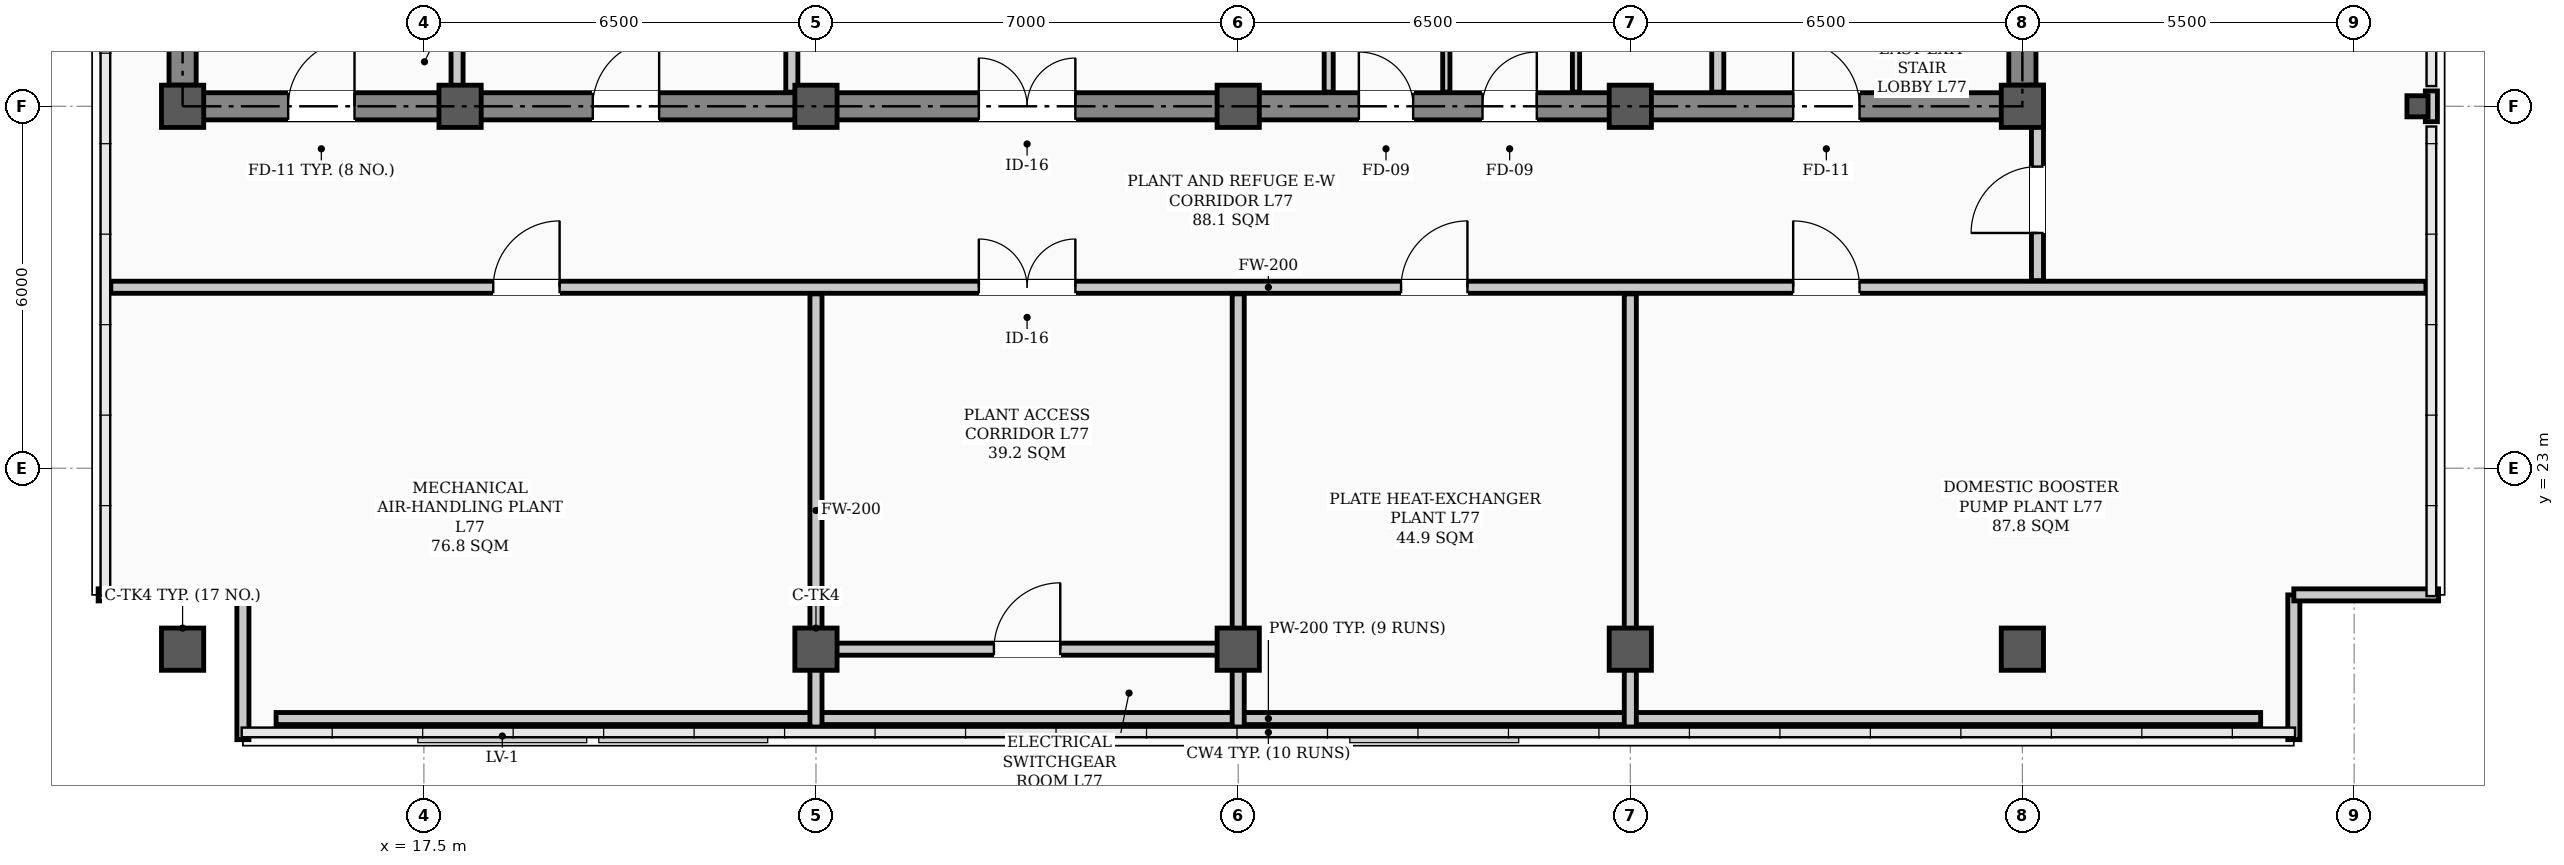
"""IFC4 building model, lengths in metres.
Left out: names, types, materials, properties, quantities, classifications, styles, units other than length and angle.
Written with IfcOpenShell. Run it as: python <this file> out.ifc"""

import sys

from ifc_helpers import new_model, si_unit, direction, frame, frame_2d, origin, origin_2d, place, context, subcontext, project, spatial, rectangle, hollow_rectangle, extrude, element, fill, save


model = new_model("IFC4")
c1 = context("Model", 3, precision=1e-05, world=origin(), true_north=direction((0.0, 1.0)))
c2 = subcontext(c1, "Body", "Model", "MODEL_VIEW")
j1 = project(units=[si_unit("LENGTHUNIT", "METRE"), si_unit("PLANEANGLEUNIT", "RADIAN")], contexts=[c1])
p1 = place(None, origin())
s1 = spatial("IfcSite", under=j1, at=p1, CompositionType="ELEMENT")
p2 = place(p1, origin())
s2 = spatial("IfcBuilding", under=s1, at=p2, CompositionType="ELEMENT")
p3 = place(p2, frame((0.0, 0.0, 312.6)))
s3 = spatial("IfcBuildingStorey", under=s2, at=p3, CompositionType="ELEMENT", Elevation=312.6)
for number, where, z_axis, x_axis in (
    (1, (13.5, 29.0, 0.0), (0.0, 0.0, 1.0), (1.0, 0.0, 0.0)),
    (2, (18.1, 29.0, 0.0), (0.0, 0.0, 1.0), (1.0, 0.0, 0.0)),
    (3, (24.0, 29.0, 0.0), (0.0, 0.0, 1.0), (1.0, 0.0, 0.0)),
    (4, (31.0, 29.0, 0.0), (0.0, 0.0, 1.0), (1.0, 0.0, 0.0)),
    (5, (37.5, 29.0, 0.0), (0.0, 0.0, 1.0), (1.0, 0.0, 0.0)),
    (6, (44.0, 29.0, 0.0), (0.0, 0.0, 1.0), (1.0, 0.0, 0.0)),
    (7, (13.5, 20.0, 0.0), (0.0, 0.0, 1.0), (1.0, 0.0, 0.0)),
    (8, (24.0, 20.0, 0.0), (0.0, 0.0, 1.0), (1.0, 0.0, 0.0)),
    (9, (31.0, 20.0, 0.0), (0.0, 0.0, 1.0), (1.0, 0.0, 0.0)),
    (10, (37.5, 20.0, 0.0), (0.0, 0.0, 1.0), (1.0, 0.0, 0.0)),
    (11, (44.0, 20.0, 0.0), (0.0, 0.0, 1.0), (1.0, 0.0, 0.0)),
):
    element("IfcColumn", number, at=place(p3, frame(where, z_axis=z_axis, x_axis=x_axis)), inside=s3, PredefinedType="COLUMN", context=c2, shape_type="SweptSolid", body=[
        extrude(hollow_rectangle(XDim=0.7, YDim=0.7, WallThickness=0.028, InnerFilletRadius=0.014, OuterFilletRadius=0.042, at=origin_2d()), origin(), (0.0, 0.0, 1.0), 4.8),
    ])
p4 = place(p3, frame((50.55, 29.0, 0.0), z_axis=(0.0, 0.0, 1.0), x_axis=(1.0, 0.0, 0.0)))
e12 = element("IfcColumn", 12, at=p4, inside=s3, PredefinedType="COLUMN", context=c2, shape_type="SweptSolid", body=[
    extrude(hollow_rectangle(XDim=0.35, YDim=0.35, WallThickness=0.016, InnerFilletRadius=0.016, OuterFilletRadius=0.032, at=origin_2d()), origin(), (0.0, 0.0, 1.0), 4.8),
])
p5 = place(p3, frame((50.78, 28.745, 0.0), z_axis=(0.0, 0.0, 1.0), x_axis=(0.0, 1.0, 0.0)))
e13 = element("IfcWall", 13, at=p5, inside=s3, PredefinedType="PARAPET", context=c2, shape_type="SweptSolid", body=[
    extrude(rectangle(XDim=0.51, YDim=0.2, at=frame_2d((0.255, 0.0))), origin(), (0.0, 0.0, 1.0), 1.2),
])
for number, where, z_axis, x_axis in (
    (14, (12.1, 20.9, 0.0), (0.0, 0.0, 1.0), (1.0, 0.0, 0.0)),
    (15, (14.5, 20.9, 0.0), (0.0, 0.0, 1.0), (0.0, -1.0, 0.0)),
    (16, (48.5, 18.5, 0.0), (0.0, 0.0, 1.0), (0.0, 1.0, 0.0)),
    (17, (48.5, 20.9, 0.0), (0.0, 0.0, 1.0), (1.0, 0.0, 0.0)),
):
    element("IfcWall", number, at=place(p3, frame(where, z_axis=z_axis, x_axis=x_axis)), inside=s3, PredefinedType="PARAPET", context=c2, shape_type="SweptSolid", body=[
        extrude(rectangle(XDim=2.4, YDim=0.2, at=frame_2d((1.2, 0.0))), origin(), (0.0, 0.0, 1.0), 1.2),
    ])
p6 = place(p3, frame((15.05, 18.85, 0.0), z_axis=(0.0, 0.0, 1.0), x_axis=(1.0, 0.0, 0.0)))
e18 = element("IfcWall", 18, at=p6, inside=s3, PredefinedType="PARAPET", context=c2, shape_type="SweptSolid", body=[
    extrude(rectangle(XDim=32.9, YDim=0.2, at=frame_2d((16.45, 0.0))), origin(), (0.0, 0.0, 1.0), 1.15),
])
p7 = place(p3, frame((13.5, 29.0, 0.0), z_axis=(0.0, 0.0, 1.0), x_axis=(1.0, 0.0, 0.0)))
e19 = element("IfcWall", 19, at=p7, inside=s3, PredefinedType="SHEAR", context=c2, shape_type="SweptSolid", body=[
    extrude(rectangle(XDim=30.5, YDim=0.45, at=frame_2d((15.25, 0.0))), origin(), (0.0, 0.0, 1.0), 4.45),
])
p8 = place(p7, frame((1.75, 0.0, 0.0)))
e20 = element("IfcOpeningElement", 20, at=p8, cuts=e19, PredefinedType="OPENING", context=c2, shape_type="SweptSolid", body=[
    extrude(rectangle(XDim=1.1, YDim=2.08, at=frame_2d((0.55, 1.04))), frame((0.0, 0.235, 0.0), z_axis=(0.0, -1.0, 0.0), x_axis=(1.0, 0.0, 0.0)), (0.0, 0.0, 1.0), 0.47),
])
p9 = place(p7, frame((26.7, 0.0, 0.0)))
e21 = element("IfcOpeningElement", 21, at=p9, cuts=e19, PredefinedType="OPENING", context=c2, shape_type="SweptSolid", body=[
    extrude(rectangle(XDim=1.1, YDim=2.08, at=frame_2d((0.55, 1.04))), frame((0.0, 0.235, 0.0), z_axis=(0.0, -1.0, 0.0), x_axis=(1.0, 0.0, 0.0)), (0.0, 0.0, 1.0), 0.47),
])
p10 = place(p7, frame((6.8, 0.0, 0.0)))
e22 = element("IfcOpeningElement", 22, at=p10, cuts=e19, PredefinedType="OPENING", context=c2, shape_type="SweptSolid", body=[
    extrude(rectangle(XDim=1.1, YDim=2.08, at=frame_2d((0.55, 1.04))), frame((0.0, 0.235, 0.0), z_axis=(0.0, -1.0, 0.0), x_axis=(1.0, 0.0, 0.0)), (0.0, 0.0, 1.0), 0.47),
])
p11 = place(p7, frame((13.2, 0.0, 0.0)))
e23 = element("IfcOpeningElement", 23, at=p11, cuts=e19, PredefinedType="OPENING", context=c2, shape_type="SweptSolid", body=[
    extrude(rectangle(XDim=1.6, YDim=2.08, at=frame_2d((0.8, 1.04))), frame((0.0, 0.235, 0.0), z_axis=(0.0, -1.0, 0.0), x_axis=(1.0, 0.0, 0.0)), (0.0, 0.0, 1.0), 0.47),
])
p12 = place(p7, frame((19.5, 0.0, 0.0)))
e24 = element("IfcOpeningElement", 24, at=p12, cuts=e19, PredefinedType="OPENING", context=c2, shape_type="SweptSolid", body=[
    extrude(rectangle(XDim=0.9, YDim=2.08, at=frame_2d((0.45, 1.04))), frame((0.0, 0.235, 0.0), z_axis=(0.0, -1.0, 0.0), x_axis=(1.0, 0.0, 0.0)), (0.0, 0.0, 1.0), 0.47),
])
p13 = place(p7, frame((21.55, 0.0, 0.0)))
e25 = element("IfcOpeningElement", 25, at=p13, cuts=e19, PredefinedType="OPENING", context=c2, shape_type="SweptSolid", body=[
    extrude(rectangle(XDim=0.9, YDim=2.08, at=frame_2d((0.45, 1.04))), frame((0.0, 0.235, 0.0), z_axis=(0.0, -1.0, 0.0), x_axis=(1.0, 0.0, 0.0)), (0.0, 0.0, 1.0), 0.47),
])
for number, where, z_axis, x_axis in (
    (26, (13.5, 29.35, 0.0), (0.0, 0.0, 1.0), (0.0, 1.0, 0.0)),
    (27, (44.0, 29.35, 0.0), (0.0, 0.0, 1.0), (0.0, 1.0, 0.0)),
):
    element("IfcWall", number, at=place(p3, frame(where, z_axis=z_axis, x_axis=x_axis)), inside=s3, PredefinedType="SHEAR", context=c2, shape_type="SweptSolid", body=[
        extrude(rectangle(XDim=8.6, YDim=0.45, at=frame_2d((4.3, 0.0))), origin(), (0.0, 0.0, 1.0), 4.45),
    ])
p14 = place(p3, frame((12.31, 26.0, 0.0), z_axis=(0.0, 0.0, 1.0), x_axis=(1.0, 0.0, 0.0)))
e28 = element("IfcWall", 28, at=p14, inside=s3, PredefinedType="STANDARD", context=c2, shape_type="SweptSolid", body=[
    extrude(rectangle(XDim=38.38, YDim=0.2, at=frame_2d((19.19, 0.0))), origin(), (0.0, 0.0, 1.0), 4.396),
])
p15 = place(p14, frame((6.34, 0.0, 0.0)))
e29 = element("IfcOpeningElement", 29, at=p15, cuts=e28, PredefinedType="OPENING", context=c2, shape_type="SweptSolid", body=[
    extrude(rectangle(XDim=1.1, YDim=2.08, at=frame_2d((0.55, 1.04))), frame((0.0, 0.11, 0.0), z_axis=(0.0, -1.0, 0.0), x_axis=(1.0, 0.0, 0.0)), (0.0, 0.0, 1.0), 0.22),
])
p16 = place(p14, frame((14.39, 0.0, 0.0)))
e30 = element("IfcOpeningElement", 30, at=p16, cuts=e28, PredefinedType="OPENING", context=c2, shape_type="SweptSolid", body=[
    extrude(rectangle(XDim=1.6, YDim=2.08, at=frame_2d((0.8, 1.04))), frame((0.0, 0.11, 0.0), z_axis=(0.0, -1.0, 0.0), x_axis=(1.0, 0.0, 0.0)), (0.0, 0.0, 1.0), 0.22),
])
p17 = place(p14, frame((21.39, 0.0, 0.0)))
e31 = element("IfcOpeningElement", 31, at=p17, cuts=e28, PredefinedType="OPENING", context=c2, shape_type="SweptSolid", body=[
    extrude(rectangle(XDim=1.1, YDim=2.08, at=frame_2d((0.55, 1.04))), frame((0.0, 0.11, 0.0), z_axis=(0.0, -1.0, 0.0), x_axis=(1.0, 0.0, 0.0)), (0.0, 0.0, 1.0), 0.22),
])
p18 = place(p14, frame((27.89, 0.0, 0.0)))
e32 = element("IfcOpeningElement", 32, at=p18, cuts=e28, PredefinedType="OPENING", context=c2, shape_type="SweptSolid", body=[
    extrude(rectangle(XDim=1.1, YDim=2.08, at=frame_2d((0.55, 1.04))), frame((0.0, 0.11, 0.0), z_axis=(0.0, -1.0, 0.0), x_axis=(1.0, 0.0, 0.0)), (0.0, 0.0, 1.0), 0.22),
])
p19 = place(p3, frame((24.0, 20.0, 0.0), z_axis=(0.0, 0.0, 1.0), x_axis=(1.0, 0.0, 0.0)))
e33 = element("IfcWall", 33, at=p19, inside=s3, PredefinedType="STANDARD", context=c2, shape_type="SweptSolid", body=[
    extrude(rectangle(XDim=7.0, YDim=0.2, at=frame_2d((3.5, 0.0))), origin(), (0.0, 0.0, 1.0), 4.396),
])
p20 = place(p19, frame((2.95, 0.0, 0.0)))
e34 = element("IfcOpeningElement", 34, at=p20, cuts=e33, PredefinedType="OPENING", context=c2, shape_type="SweptSolid", body=[
    extrude(rectangle(XDim=1.1, YDim=2.08, at=frame_2d((0.55, 1.04))), frame((0.0, 0.11, 0.0), z_axis=(0.0, -1.0, 0.0), x_axis=(1.0, 0.0, 0.0)), (0.0, 0.0, 1.0), 0.22),
])
for number, where, z_axis, x_axis in (
    (35, (18.05, 29.235, 0.0), (0.0, 0.0, 1.0), (0.0, 1.0, 0.0)),
    (36, (38.95, 29.235, 0.0), (0.0, 0.0, 1.0), (0.0, 1.0, 0.0)),
):
    element("IfcWall", number, at=place(p3, frame(where, z_axis=z_axis, x_axis=x_axis)), inside=s3, PredefinedType="STANDARD", context=c2, shape_type="SweptSolid", body=[
        extrude(rectangle(XDim=1.065, YDim=0.2, at=frame_2d((0.532, 0.0))), origin(), (0.0, 0.0, 1.0), 4.45),
    ])
p21 = place(p3, frame((23.6, 29.235, 0.0), z_axis=(0.0, 0.0, 1.0), x_axis=(0.0, 1.0, 0.0)))
e37 = element("IfcWall", 37, at=p21, inside=s3, PredefinedType="STANDARD", context=c2, shape_type="SweptSolid", body=[
    extrude(rectangle(XDim=5.465, YDim=0.2, at=frame_2d((2.732, 0.0))), origin(), (0.0, 0.0, 1.0), 4.396),
])
p22 = place(p3, frame((32.5, 29.235, 0.0), z_axis=(0.0, 0.0, 1.0), x_axis=(0.0, 1.0, 0.0)))
e38 = element("IfcWall", 38, at=p22, inside=s3, PredefinedType="PARTITIONING", context=c2, shape_type="SweptSolid", body=[
    extrude(rectangle(XDim=2.53, YDim=0.15, at=frame_2d((1.265, 0.0))), origin(), (0.0, 0.0, 1.0), 4.45),
])
for number, where, z_axis, x_axis in (
    (39, (36.6, 29.235, 0.0), (0.0, 0.0, 1.0), (0.0, 1.0, 0.0)),
    (40, (34.45, 29.235, 0.0), (0.0, 0.0, 1.0), (0.0, 1.0, 0.0)),
):
    element("IfcWall", number, at=place(p3, frame(where, z_axis=z_axis, x_axis=x_axis)), inside=s3, PredefinedType="PARTITIONING", context=c2, shape_type="SweptSolid", body=[
        extrude(rectangle(XDim=2.53, YDim=0.12, at=frame_2d((1.265, 0.0))), origin(), (0.0, 0.0, 1.0), 4.45),
    ])
p23 = place(p3, frame((44.25, 26.11, 0.0), z_axis=(0.0, 0.0, 1.0), x_axis=(0.0, 1.0, 0.0)))
e41 = element("IfcWall", 41, at=p23, inside=s3, PredefinedType="STANDARD", context=c2, shape_type="SweptSolid", body=[
    extrude(rectangle(XDim=3.24, YDim=0.2, at=frame_2d((1.62, 0.0))), origin(), (0.0, 0.0, 1.0), 4.396),
])
p24 = place(p23, frame((0.79, 0.0, 0.0)))
e42 = element("IfcOpeningElement", 42, at=p24, cuts=e41, PredefinedType="OPENING", context=c2, shape_type="SweptSolid", body=[
    extrude(rectangle(XDim=1.1, YDim=2.08, at=frame_2d((0.55, 1.04))), frame((0.0, 0.11, 0.0), z_axis=(0.0, -1.0, 0.0), x_axis=(1.0, 0.0, 0.0)), (0.0, 0.0, 1.0), 0.22),
])
for number, where, z_axis, x_axis in (
    (43, (24.0, 18.71, 0.0), (0.0, 0.0, 1.0), (0.0, 1.0, 0.0)),
    (44, (31.0, 18.71, 0.0), (0.0, 0.0, 1.0), (0.0, 1.0, 0.0)),
    (45, (37.5, 18.71, 0.0), (0.0, 0.0, 1.0), (0.0, 1.0, 0.0)),
):
    element("IfcWall", number, at=place(p3, frame(where, z_axis=z_axis, x_axis=x_axis)), inside=s3, PredefinedType="STANDARD", context=c2, shape_type="SweptSolid", body=[
        extrude(rectangle(XDim=7.18, YDim=0.2, at=frame_2d((3.59, 0.0))), origin(), (0.0, 0.0, 1.0), 4.396),
    ])
p25 = place(p8, origin())
e46 = element("IfcDoor", 46, at=p25, inside=s3, OperationType="SINGLE_SWING_RIGHT", PredefinedType="DOOR", context=c2, shape_type="SweptSolid", body=[
    extrude(rectangle(XDim=1.1, YDim=2.08, at=frame_2d((0.55, 1.04))), frame((0.0, 0.025, 0.0), z_axis=(0.0, -1.0, 0.0), x_axis=(1.0, 0.0, 0.0)), (0.0, 0.0, 1.0), 0.05),
])
fill(e20, e46)
p26 = place(p9, origin())
e47 = element("IfcDoor", 47, at=p26, inside=s3, OperationType="SINGLE_SWING_LEFT", PredefinedType="DOOR", context=c2, shape_type="SweptSolid", body=[
    extrude(rectangle(XDim=1.1, YDim=2.08, at=frame_2d((0.55, 1.04))), frame((0.0, 0.025, 0.0), z_axis=(0.0, -1.0, 0.0), x_axis=(1.0, 0.0, 0.0)), (0.0, 0.0, 1.0), 0.05),
])
fill(e21, e47)
p27 = place(p10, origin())
e48 = element("IfcDoor", 48, at=p27, inside=s3, OperationType="SINGLE_SWING_RIGHT", PredefinedType="DOOR", context=c2, shape_type="SweptSolid", body=[
    extrude(rectangle(XDim=1.1, YDim=2.08, at=frame_2d((0.55, 1.04))), frame((0.0, 0.025, 0.0), z_axis=(0.0, -1.0, 0.0), x_axis=(1.0, 0.0, 0.0)), (0.0, 0.0, 1.0), 0.05),
])
fill(e22, e48)
p28 = place(p11, origin())
e49 = element("IfcDoor", 49, at=p28, inside=s3, OperationType="DOUBLE_DOOR_SINGLE_SWING", PredefinedType="DOOR", context=c2, shape_type="SweptSolid", body=[
    extrude(rectangle(XDim=1.6, YDim=2.08, at=frame_2d((0.8, 1.04))), frame((0.0, 0.025, 0.0), z_axis=(0.0, -1.0, 0.0), x_axis=(1.0, 0.0, 0.0)), (0.0, 0.0, 1.0), 0.05),
])
fill(e23, e49)
p29 = place(p12, origin())
e50 = element("IfcDoor", 50, at=p29, inside=s3, OperationType="SINGLE_SWING_LEFT", PredefinedType="DOOR", context=c2, shape_type="SweptSolid", body=[
    extrude(rectangle(XDim=0.9, YDim=2.08, at=frame_2d((0.45, 1.04))), frame((0.0, 0.025, 0.0), z_axis=(0.0, -1.0, 0.0), x_axis=(1.0, 0.0, 0.0)), (0.0, 0.0, 1.0), 0.05),
])
fill(e24, e50)
p30 = place(p13, origin())
e51 = element("IfcDoor", 51, at=p30, inside=s3, OperationType="SINGLE_SWING_RIGHT", PredefinedType="DOOR", context=c2, shape_type="SweptSolid", body=[
    extrude(rectangle(XDim=0.9, YDim=2.08, at=frame_2d((0.45, 1.04))), frame((0.0, 0.025, 0.0), z_axis=(0.0, -1.0, 0.0), x_axis=(1.0, 0.0, 0.0)), (0.0, 0.0, 1.0), 0.05),
])
fill(e25, e51)
p31 = place(p24, origin())
e52 = element("IfcDoor", 52, at=p31, inside=s3, OperationType="SINGLE_SWING_LEFT", PredefinedType="DOOR", context=c2, shape_type="SweptSolid", body=[
    extrude(rectangle(XDim=1.1, YDim=2.08, at=frame_2d((0.55, 1.04))), frame((0.0, 0.025, 0.0), z_axis=(0.0, -1.0, 0.0), x_axis=(1.0, 0.0, 0.0)), (0.0, 0.0, 1.0), 0.05),
])
fill(e42, e52)
p32 = place(p15, origin())
e53 = element("IfcDoor", 53, at=p32, inside=s3, OperationType="SINGLE_SWING_RIGHT", PredefinedType="DOOR", context=c2, shape_type="SweptSolid", body=[
    extrude(rectangle(XDim=1.1, YDim=2.08, at=frame_2d((0.55, 1.04))), frame((0.0, 0.025, 0.0), z_axis=(0.0, -1.0, 0.0), x_axis=(1.0, 0.0, 0.0)), (0.0, 0.0, 1.0), 0.05),
])
fill(e29, e53)
p33 = place(p16, origin())
e54 = element("IfcDoor", 54, at=p33, inside=s3, OperationType="DOUBLE_DOOR_SINGLE_SWING", PredefinedType="DOOR", context=c2, shape_type="SweptSolid", body=[
    extrude(rectangle(XDim=1.6, YDim=2.08, at=frame_2d((0.8, 1.04))), frame((0.0, 0.025, 0.0), z_axis=(0.0, -1.0, 0.0), x_axis=(1.0, 0.0, 0.0)), (0.0, 0.0, 1.0), 0.05),
])
fill(e30, e54)
p34 = place(p17, origin())
e55 = element("IfcDoor", 55, at=p34, inside=s3, OperationType="SINGLE_SWING_RIGHT", PredefinedType="DOOR", context=c2, shape_type="SweptSolid", body=[
    extrude(rectangle(XDim=1.1, YDim=2.08, at=frame_2d((0.55, 1.04))), frame((0.0, 0.025, 0.0), z_axis=(0.0, -1.0, 0.0), x_axis=(1.0, 0.0, 0.0)), (0.0, 0.0, 1.0), 0.05),
])
fill(e31, e55)
p35 = place(p18, origin())
e56 = element("IfcDoor", 56, at=p35, inside=s3, OperationType="SINGLE_SWING_LEFT", PredefinedType="DOOR", context=c2, shape_type="SweptSolid", body=[
    extrude(rectangle(XDim=1.1, YDim=2.08, at=frame_2d((0.55, 1.04))), frame((0.0, 0.025, 0.0), z_axis=(0.0, -1.0, 0.0), x_axis=(1.0, 0.0, 0.0)), (0.0, 0.0, 1.0), 0.05),
])
fill(e32, e56)
p36 = place(p20, origin())
e57 = element("IfcDoor", 57, at=p36, inside=s3, OperationType="SINGLE_SWING_RIGHT", PredefinedType="DOOR", context=c2, shape_type="SweptSolid", body=[
    extrude(rectangle(XDim=1.1, YDim=2.08, at=frame_2d((0.55, 1.04))), frame((0.0, 0.025, 0.0), z_axis=(0.0, -1.0, 0.0), x_axis=(1.0, 0.0, 0.0)), (0.0, 0.0, 1.0), 0.05),
])
fill(e34, e57)
save(model, sys.argv[1])
